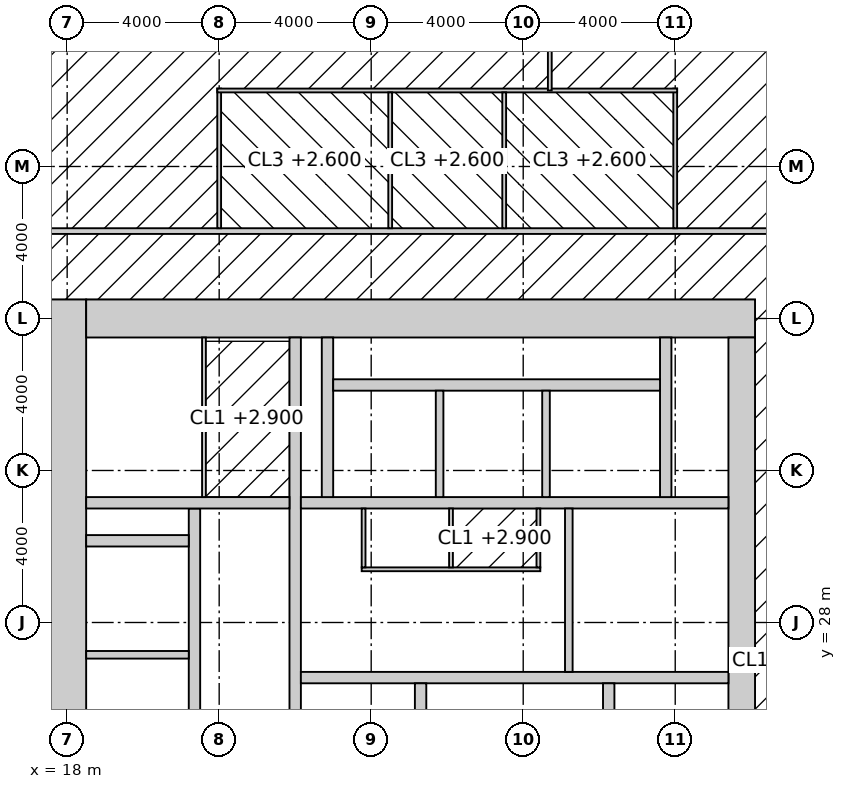
"""IFC4 building model, lengths in metres.
Left out: names, types, materials, properties, quantities, classifications, styles, units other than length and angle.
Written with IfcOpenShell. Run it as: python <this file> out.ifc"""

import sys

from ifc_helpers import new_model, si_unit, direction, frame, frame_2d, origin, place, context, subcontext, project, spatial, rectangle, extrude, element, fill, save


model = new_model("IFC4")
c1 = context("Model", 3, precision=1e-05, world=origin(), true_north=direction((0.0, 1.0)))
c2 = subcontext(c1, "Body", "Model", "MODEL_VIEW")
j1 = project(units=[si_unit("LENGTHUNIT", "METRE"), si_unit("PLANEANGLEUNIT", "RADIAN")], contexts=[c1])
p1 = place(None, origin())
s1 = spatial("IfcSite", under=j1, at=p1, CompositionType="ELEMENT")
p2 = place(p1, origin())
s2 = spatial("IfcBuilding", under=s1, at=p2, CompositionType="ELEMENT")
p3 = place(p2, frame((0.0, 0.0, 113.4)))
s3 = spatial("IfcBuildingStorey", under=s2, at=p3, CompositionType="ELEMENT", Elevation=113.4)
p4 = place(p3, frame((18.0, 17.5, -0.15), z_axis=(0.0, 0.0, 1.0), x_axis=(0.0, 1.0, 0.0)))
e1 = element("IfcWall", 1, at=p4, inside=s3, PredefinedType="SHEAR", context=c2, shape_type="SweptSolid", body=[
    extrude(rectangle(XDim=19.0, YDim=1.0, at=frame_2d((9.5, 0.0))), origin(), (0.0, 0.0, 1.0), 4.0),
])
p5 = place(p3, frame((18.5, 36.0, -0.15), z_axis=(0.0, 0.0, 1.0), x_axis=(1.0, 0.0, 0.0)))
e2 = element("IfcWall", 2, at=p5, inside=s3, PredefinedType="SHEAR", context=c2, shape_type="SweptSolid", body=[
    extrude(rectangle(XDim=17.6, YDim=1.0, at=frame_2d((8.8, 0.0))), origin(), (0.0, 0.0, 1.0), 4.0),
])
p6 = place(p3, frame((35.75, 18.5, -0.15), z_axis=(0.0, 0.0, 1.0), x_axis=(0.0, 1.0, 0.0)))
e3 = element("IfcWall", 3, at=p6, inside=s3, PredefinedType="SHEAR", context=c2, shape_type="SweptSolid", body=[
    extrude(rectangle(XDim=17.0, YDim=0.7, at=frame_2d((8.5, 0.0))), origin(), (0.0, 0.0, 1.0), 4.0),
])
p7 = place(p6, frame((9.85, 0.0, 0.15)))
e4 = element("IfcOpeningElement", 4, at=p7, cuts=e3, PredefinedType="OPENING", context=c2, shape_type="SweptSolid", body=[
    extrude(rectangle(XDim=1.0, YDim=2.2, at=frame_2d((0.5, 1.1))), frame((0.0, 0.36, 0.0), z_axis=(0.0, -1.0, 0.0), x_axis=(1.0, 0.0, 0.0)), (0.0, 0.0, 1.0), 0.72),
])
p8 = place(p3, frame((24.0, 18.5, -0.15), z_axis=(0.0, 0.0, 1.0), x_axis=(0.0, 1.0, 0.0)))
e5 = element("IfcWall", 5, at=p8, inside=s3, PredefinedType="SHEAR", context=c2, shape_type="SweptSolid", body=[
    extrude(rectangle(XDim=17.0, YDim=0.3, at=frame_2d((8.5, 0.0))), origin(), (0.0, 0.0, 1.0), 4.0),
])
p9 = place(p8, frame((9.6, 0.0, 0.15)))
e6 = element("IfcOpeningElement", 6, at=p9, cuts=e5, PredefinedType="OPENING", context=c2, shape_type="SweptSolid", body=[
    extrude(rectangle(XDim=1.5, YDim=2.4, at=frame_2d((0.75, 1.2))), frame((0.0, 0.16, 0.0), z_axis=(0.0, -1.0, 0.0), x_axis=(1.0, 0.0, 0.0)), (0.0, 0.0, 1.0), 0.32),
])
p10 = place(p3, frame((24.15, 26.55, -0.15), z_axis=(0.0, 0.0, 1.0), x_axis=(1.0, 0.0, 0.0)))
e7 = element("IfcWall", 7, at=p10, inside=s3, PredefinedType="SHEAR", context=c2, shape_type="SweptSolid", body=[
    extrude(rectangle(XDim=11.25, YDim=0.3, at=frame_2d((5.625, 0.0))), origin(), (0.0, 0.0, 1.0), 4.0),
])
p11 = place(p10, frame((9.25, 0.0, 0.15)))
e8 = element("IfcOpeningElement", 8, at=p11, cuts=e7, PredefinedType="OPENING", context=c2, shape_type="SweptSolid", body=[
    extrude(rectangle(XDim=1.0, YDim=2.2, at=frame_2d((0.5, 1.1))), frame((0.0, 0.16, 0.0), z_axis=(0.0, -1.0, 0.0), x_axis=(1.0, 0.0, 0.0)), (0.0, 0.0, 1.0), 0.32),
])
p12 = place(p10, frame((4.9, 0.0, 0.15)))
e9 = element("IfcOpeningElement", 9, at=p12, cuts=e7, PredefinedType="OPENING", context=c2, shape_type="SweptSolid", body=[
    extrude(rectangle(XDim=1.5, YDim=2.4, at=frame_2d((0.75, 1.2))), frame((0.0, 0.16, 0.0), z_axis=(0.0, -1.0, 0.0), x_axis=(1.0, 0.0, 0.0)), (0.0, 0.0, 1.0), 0.32),
])
p13 = place(p3, frame((27.3, 18.5, -0.15), z_axis=(0.0, 0.0, 1.0), x_axis=(0.0, 1.0, 0.0)))
e10 = element("IfcWall", 10, at=p13, inside=s3, PredefinedType="SHEAR", context=c2, shape_type="SweptSolid", body=[
    extrude(rectangle(XDim=7.9, YDim=0.3, at=frame_2d((3.95, 0.0))), origin(), (0.0, 0.0, 1.0), 4.0),
])
p14 = place(p13, frame((6.4, 0.0, 0.15)))
e11 = element("IfcOpeningElement", 11, at=p14, cuts=e10, PredefinedType="OPENING", context=c2, shape_type="SweptSolid", body=[
    extrude(rectangle(XDim=1.0, YDim=2.2, at=frame_2d((0.5, 1.1))), frame((0.0, 0.16, 0.0), z_axis=(0.0, -1.0, 0.0), x_axis=(1.0, 0.0, 0.0)), (0.0, 0.0, 1.0), 0.32),
])
p15 = place(p3, frame((32.25, 18.5, -0.15), z_axis=(0.0, 0.0, 1.0), x_axis=(0.0, 1.0, 0.0)))
e12 = element("IfcWall", 12, at=p15, inside=s3, PredefinedType="SHEAR", context=c2, shape_type="SweptSolid", body=[
    extrude(rectangle(XDim=7.9, YDim=0.3, at=frame_2d((3.95, 0.0))), origin(), (0.0, 0.0, 1.0), 4.0),
])
p16 = place(p3, frame((24.15, 31.15, -0.15), z_axis=(0.0, 0.0, 1.0), x_axis=(1.0, 0.0, 0.0)))
e13 = element("IfcWall", 13, at=p16, inside=s3, PredefinedType="SHEAR", context=c2, shape_type="SweptSolid", body=[
    extrude(rectangle(XDim=11.25, YDim=0.3, at=frame_2d((5.625, 0.0))), origin(), (0.0, 0.0, 1.0), 4.0),
])
p17 = place(p16, frame((7.25, 0.0, 0.15)))
e14 = element("IfcOpeningElement", 14, at=p17, cuts=e13, PredefinedType="OPENING", context=c2, shape_type="SweptSolid", body=[
    extrude(rectangle(XDim=1.4, YDim=2.4, at=frame_2d((0.7, 1.2))), frame((0.0, 0.16, 0.0), z_axis=(0.0, -1.0, 0.0), x_axis=(1.0, 0.0, 0.0)), (0.0, 0.0, 1.0), 0.32),
])
p18 = place(p3, frame((21.35, 18.5, -0.15), z_axis=(0.0, 0.0, 1.0), x_axis=(0.0, 1.0, 0.0)))
e15 = element("IfcWall", 15, at=p18, inside=s3, PredefinedType="SHEAR", context=c2, shape_type="SweptSolid", body=[
    extrude(rectangle(XDim=12.5, YDim=0.3, at=frame_2d((6.25, 0.0))), origin(), (0.0, 0.0, 1.0), 4.0),
])
p19 = place(p18, frame((0.875, 0.0, 0.15)))
e16 = element("IfcOpeningElement", 16, at=p19, cuts=e15, PredefinedType="OPENING", context=c2, shape_type="SweptSolid", body=[
    extrude(rectangle(XDim=1.1, YDim=2.2, at=frame_2d((0.55, 1.1))), frame((0.0, 0.16, 0.0), z_axis=(0.0, -1.0, 0.0), x_axis=(1.0, 0.0, 0.0)), (0.0, 0.0, 1.0), 0.32),
])
p20 = place(p18, frame((3.825, 0.0, 0.15)))
e17 = element("IfcOpeningElement", 17, at=p20, cuts=e15, PredefinedType="OPENING", context=c2, shape_type="SweptSolid", body=[
    extrude(rectangle(XDim=1.1, YDim=2.2, at=frame_2d((0.55, 1.1))), frame((0.0, 0.16, 0.0), z_axis=(0.0, -1.0, 0.0), x_axis=(1.0, 0.0, 0.0)), (0.0, 0.0, 1.0), 0.32),
])
p21 = place(p18, frame((6.675, 0.0, 0.15)))
e18 = element("IfcOpeningElement", 18, at=p21, cuts=e15, PredefinedType="OPENING", context=c2, shape_type="SweptSolid", body=[
    extrude(rectangle(XDim=1.1, YDim=2.2, at=frame_2d((0.55, 1.1))), frame((0.0, 0.16, 0.0), z_axis=(0.0, -1.0, 0.0), x_axis=(1.0, 0.0, 0.0)), (0.0, 0.0, 1.0), 0.32),
])
p22 = place(p18, frame((9.575, 0.0, 0.15)))
e19 = element("IfcOpeningElement", 19, at=p22, cuts=e15, PredefinedType="OPENING", context=c2, shape_type="SweptSolid", body=[
    extrude(rectangle(XDim=1.1, YDim=2.2, at=frame_2d((0.55, 1.1))), frame((0.0, 0.16, 0.0), z_axis=(0.0, -1.0, 0.0), x_axis=(1.0, 0.0, 0.0)), (0.0, 0.0, 1.0), 0.32),
])
p23 = place(p3, frame((18.5, 31.15, -0.15), z_axis=(0.0, 0.0, 1.0), x_axis=(1.0, 0.0, 0.0)))
e20 = element("IfcWall", 20, at=p23, inside=s3, PredefinedType="SHEAR", context=c2, shape_type="SweptSolid", body=[
    extrude(rectangle(XDim=5.35, YDim=0.3, at=frame_2d((2.675, 0.0))), origin(), (0.0, 0.0, 1.0), 4.0),
])
p24 = place(p23, frame((3.4, 0.0, 0.15)))
e21 = element("IfcOpeningElement", 21, at=p24, cuts=e20, PredefinedType="OPENING", context=c2, shape_type="SweptSolid", body=[
    extrude(rectangle(XDim=1.0, YDim=2.2, at=frame_2d((0.5, 1.1))), frame((0.0, 0.16, 0.0), z_axis=(0.0, -1.0, 0.0), x_axis=(1.0, 0.0, 0.0)), (0.0, 0.0, 1.0), 0.32),
])
p25 = place(p3, frame((18.5, 30.15, -0.15), z_axis=(0.0, 0.0, 1.0), x_axis=(1.0, 0.0, 0.0)))
e22 = element("IfcWall", 22, at=p25, inside=s3, PredefinedType="SHEAR", context=c2, shape_type="SweptSolid", body=[
    extrude(rectangle(XDim=2.7, YDim=0.3, at=frame_2d((1.35, 0.0))), origin(), (0.0, 0.0, 1.0), 4.0),
])
for number, where, z_axis, x_axis in (
    (23, (24.85, 31.3, -0.15), (0.0, 0.0, 1.0), (0.0, 1.0, 0.0)),
    (24, (33.75, 31.3, -0.15), (0.0, 0.0, 1.0), (0.0, 1.0, 0.0)),
):
    element("IfcWall", number, at=place(p3, frame(where, z_axis=z_axis, x_axis=x_axis)), inside=s3, PredefinedType="SHEAR", context=c2, shape_type="SweptSolid", body=[
        extrude(rectangle(XDim=4.2, YDim=0.3, at=frame_2d((2.1, 0.0))), origin(), (0.0, 0.0, 1.0), 4.0),
    ])
p26 = place(p3, frame((25.0, 34.25, -0.15), z_axis=(0.0, 0.0, 1.0), x_axis=(1.0, 0.0, 0.0)))
e25 = element("IfcWall", 25, at=p26, inside=s3, PredefinedType="SHEAR", context=c2, shape_type="SweptSolid", body=[
    extrude(rectangle(XDim=8.6, YDim=0.3, at=frame_2d((4.3, 0.0))), origin(), (0.0, 0.0, 1.0), 4.0),
])
for number, where, z_axis, x_axis in (
    (26, (27.8, 31.3, -0.15), (0.0, 0.0, 1.0), (0.0, 1.0, 0.0)),
    (27, (30.6, 31.3, -0.15), (0.0, 0.0, 1.0), (0.0, 1.0, 0.0)),
):
    element("IfcWall", number, at=place(p3, frame(where, z_axis=z_axis, x_axis=x_axis)), inside=s3, PredefinedType="SOLIDWALL", context=c2, shape_type="SweptSolid", body=[
        extrude(rectangle(XDim=2.8, YDim=0.2, at=frame_2d((1.4, 0.0))), origin(), (0.0, 0.0, 1.0), 4.0),
    ])
p27 = place(p3, frame((18.5, 27.15, -0.15), z_axis=(0.0, 0.0, 1.0), x_axis=(1.0, 0.0, 0.0)))
e28 = element("IfcWall", 28, at=p27, inside=s3, PredefinedType="SOLIDWALL", context=c2, shape_type="SweptSolid", body=[
    extrude(rectangle(XDim=2.7, YDim=0.2, at=frame_2d((1.35, 0.0))), origin(), (0.0, 0.0, 1.0), 4.0),
])
p28 = place(p3, frame((31.2, 26.7, 0.0), z_axis=(0.0, 0.0, 1.0), x_axis=(0.0, 1.0, 0.0)))
e29 = element("IfcWall", 29, at=p28, inside=s3, PredefinedType="SOLIDWALL", context=c2, shape_type="SweptSolid", body=[
    extrude(rectangle(XDim=4.3, YDim=0.2, at=frame_2d((2.15, 0.0))), origin(), (0.0, 0.0, 1.0), 3.85),
])
p29 = place(p3, frame((21.6, 31.3, 0.0), z_axis=(0.0, 0.0, 1.0), x_axis=(0.0, 1.0, 0.0)))
e30 = element("IfcWall", 30, at=p29, inside=s3, PredefinedType="PARTITIONING", context=c2, shape_type="SweptSolid", body=[
    extrude(rectangle(XDim=4.2, YDim=0.1, at=frame_2d((2.1, 0.0))), origin(), (0.0, 0.0, 1.0), 3.85),
])
p30 = place(p29, frame((1.55, 0.0, 0.0)))
e31 = element("IfcOpeningElement", 31, at=p30, cuts=e30, PredefinedType="OPENING", context=c2, shape_type="SweptSolid", body=[
    extrude(rectangle(XDim=1.0, YDim=2.2, at=frame_2d((0.5, 1.1))), frame((0.0, 0.06, 0.0), z_axis=(0.0, -1.0, 0.0), x_axis=(1.0, 0.0, 0.0)), (0.0, 0.0, 1.0), 0.12),
])
p31 = place(p3, frame((25.75, 29.4, 0.0), z_axis=(0.0, 0.0, 1.0), x_axis=(1.0, 0.0, 0.0)))
e32 = element("IfcWall", 32, at=p31, inside=s3, PredefinedType="PARTITIONING", context=c2, shape_type="SweptSolid", body=[
    extrude(rectangle(XDim=4.7, YDim=0.1, at=frame_2d((2.35, 0.0))), origin(), (0.0, 0.0, 1.0), 3.85),
])
p32 = place(p31, frame((0.7, 0.0, 0.0)))
e33 = element("IfcOpeningElement", 33, at=p32, cuts=e32, PredefinedType="OPENING", context=c2, shape_type="SweptSolid", body=[
    extrude(rectangle(XDim=1.0, YDim=2.2, at=frame_2d((0.5, 1.1))), frame((0.0, 0.06, 0.0), z_axis=(0.0, -1.0, 0.0), x_axis=(1.0, 0.0, 0.0)), (0.0, 0.0, 1.0), 0.12),
])
p33 = place(p31, frame((3.0, 0.0, 0.0)))
e34 = element("IfcOpeningElement", 34, at=p33, cuts=e32, PredefinedType="OPENING", context=c2, shape_type="SweptSolid", body=[
    extrude(rectangle(XDim=1.0, YDim=2.2, at=frame_2d((0.5, 1.1))), frame((0.0, 0.06, 0.0), z_axis=(0.0, -1.0, 0.0), x_axis=(1.0, 0.0, 0.0)), (0.0, 0.0, 1.0), 0.12),
])
for number, where, z_axis, x_axis in (
    (35, (25.8, 29.45, 0.0), (0.0, 0.0, 1.0), (0.0, 1.0, 0.0)),
    (36, (30.4, 29.45, 0.0), (0.0, 0.0, 1.0), (0.0, 1.0, 0.0)),
    (37, (28.1, 29.45, 0.0), (0.0, 0.0, 1.0), (0.0, 1.0, 0.0)),
):
    element("IfcWall", number, at=place(p3, frame(where, z_axis=z_axis, x_axis=x_axis)), inside=s3, PredefinedType="PARTITIONING", context=c2, shape_type="SweptSolid", body=[
        extrude(rectangle(XDim=1.55, YDim=0.1, at=frame_2d((0.775, 0.0))), origin(), (0.0, 0.0, 1.0), 3.85),
    ])
p34 = place(p3, frame((17.5, 38.3, 0.0), z_axis=(0.0, 0.0, 1.0), x_axis=(1.0, 0.0, 0.0)))
e38 = element("IfcWall", 38, at=p34, inside=s3, PredefinedType="PARTITIONING", context=c2, shape_type="SweptSolid", body=[
    extrude(rectangle(XDim=20.325, YDim=0.15, at=frame_2d((10.163, 0.0))), origin(), (0.0, 0.0, 1.0), 3.85),
])
p35 = place(p34, frame((6.25, 0.0, 0.0)))
e39 = element("IfcOpeningElement", 39, at=p35, cuts=e38, PredefinedType="OPENING", context=c2, shape_type="SweptSolid", body=[
    extrude(rectangle(XDim=0.9, YDim=2.1, at=frame_2d((0.45, 1.05))), frame((0.0, 0.085, 0.0), z_axis=(0.0, -1.0, 0.0), x_axis=(1.0, 0.0, 0.0)), (0.0, 0.0, 1.0), 0.17),
])
p36 = place(p34, frame((10.0, 0.0, 0.0)))
e40 = element("IfcOpeningElement", 40, at=p36, cuts=e38, PredefinedType="OPENING", context=c2, shape_type="SweptSolid", body=[
    extrude(rectangle(XDim=1.0, YDim=2.1, at=frame_2d((0.5, 1.05))), frame((0.0, 0.085, 0.0), z_axis=(0.0, -1.0, 0.0), x_axis=(1.0, 0.0, 0.0)), (0.0, 0.0, 1.0), 0.17),
])
p37 = place(p34, frame((13.85, 0.0, 0.0)))
e41 = element("IfcOpeningElement", 41, at=p37, cuts=e38, PredefinedType="OPENING", context=c2, shape_type="SweptSolid", body=[
    extrude(rectangle(XDim=0.9, YDim=2.1, at=frame_2d((0.45, 1.05))), frame((0.0, 0.085, 0.0), z_axis=(0.0, -1.0, 0.0), x_axis=(1.0, 0.0, 0.0)), (0.0, 0.0, 1.0), 0.17),
])
for number, where, z_axis, x_axis in (
    (42, (22.0, 38.375, 0.0), (0.0, 0.0, 1.0), (0.0, 1.0, 0.0)),
    (43, (34.0, 38.375, 0.0), (0.0, 0.0, 1.0), (0.0, 1.0, 0.0)),
):
    element("IfcWall", number, at=place(p3, frame(where, z_axis=z_axis, x_axis=x_axis)), inside=s3, PredefinedType="PARTITIONING", context=c2, shape_type="SweptSolid", body=[
        extrude(rectangle(XDim=3.675, YDim=0.1, at=frame_2d((1.837, 0.0))), origin(), (0.0, 0.0, 1.0), 2.95),
    ])
p38 = place(p3, frame((21.95, 42.0, 0.0), z_axis=(0.0, 0.0, 1.0), x_axis=(1.0, 0.0, 0.0)))
e44 = element("IfcWall", 44, at=p38, inside=s3, PredefinedType="PARTITIONING", context=c2, shape_type="SweptSolid", body=[
    extrude(rectangle(XDim=12.1, YDim=0.1, at=frame_2d((6.05, 0.0))), origin(), (0.0, 0.0, 1.0), 3.85),
])
for number, where, z_axis, x_axis in (
    (45, (26.5, 38.375, 0.0), (0.0, 0.0, 1.0), (0.0, 1.0, 0.0)),
    (46, (29.5, 38.375, 0.0), (0.0, 0.0, 1.0), (0.0, 1.0, 0.0)),
):
    element("IfcWall", number, at=place(p3, frame(where, z_axis=z_axis, x_axis=x_axis)), inside=s3, PredefinedType="PARTITIONING", context=c2, shape_type="SweptSolid", body=[
        extrude(rectangle(XDim=3.575, YDim=0.1, at=frame_2d((1.788, 0.0))), origin(), (0.0, 0.0, 1.0), 3.85),
    ])
p39 = place(p3, frame((30.7, 42.0, 0.0), z_axis=(0.0, 0.0, 1.0), x_axis=(0.0, 1.0, 0.0)))
e47 = element("IfcWall", 47, at=p39, inside=s3, PredefinedType="PARTITIONING", context=c2, shape_type="SweptSolid", body=[
    extrude(rectangle(XDim=9.7, YDim=0.1, at=frame_2d((4.85, 0.0))), origin(), (0.0, 0.0, 1.0), 3.85),
])
p40 = place(p39, frame((4.35, 0.0, 0.0)))
e48 = element("IfcOpeningElement", 48, at=p40, cuts=e47, PredefinedType="OPENING", context=c2, shape_type="SweptSolid", body=[
    extrude(rectangle(XDim=1.0, YDim=2.2, at=frame_2d((0.5, 1.1))), frame((0.0, 0.06, 0.0), z_axis=(0.0, -1.0, 0.0), x_axis=(1.0, 0.0, 0.0)), (0.0, 0.0, 1.0), 0.12),
])
p41 = place(p14, origin())
e49 = element("IfcDoor", 49, at=p41, inside=s3, OperationType="SINGLE_SWING_RIGHT", PredefinedType="DOOR", context=c2, shape_type="SweptSolid", body=[
    extrude(rectangle(XDim=1.0, YDim=2.2, at=frame_2d((0.5, 1.1))), frame((0.0, 0.025, 0.0), z_axis=(0.0, -1.0, 0.0), x_axis=(1.0, 0.0, 0.0)), (0.0, 0.0, 1.0), 0.05),
])
fill(e11, e49)
p42 = place(p11, frame((1.0, 0.0, 0.0), z_axis=(0.0, 0.0, 1.0), x_axis=(-1.0, 0.0, 0.0)))
e50 = element("IfcDoor", 50, at=p42, inside=s3, OperationType="SINGLE_SWING_RIGHT", PredefinedType="DOOR", context=c2, shape_type="SweptSolid", body=[
    extrude(rectangle(XDim=1.0, YDim=2.2, at=frame_2d((0.5, 1.1))), frame((0.0, 0.025, 0.0), z_axis=(0.0, -1.0, 0.0), x_axis=(1.0, 0.0, 0.0)), (0.0, 0.0, 1.0), 0.05),
])
fill(e8, e50)
p43 = place(p7, origin())
e51 = element("IfcDoor", 51, at=p43, inside=s3, OperationType="SINGLE_SWING_RIGHT", PredefinedType="DOOR", context=c2, shape_type="SweptSolid", body=[
    extrude(rectangle(XDim=1.0, YDim=2.2, at=frame_2d((0.5, 1.1))), frame((0.0, 0.025, 0.0), z_axis=(0.0, -1.0, 0.0), x_axis=(1.0, 0.0, 0.0)), (0.0, 0.0, 1.0), 0.05),
])
fill(e4, e51)
p44 = place(p12, origin())
e52 = element("IfcDoor", 52, at=p44, inside=s3, OperationType="DOUBLE_DOOR_DOUBLE_SWING", PredefinedType="DOOR", context=c2, shape_type="SweptSolid", body=[
    extrude(rectangle(XDim=1.5, YDim=2.4, at=frame_2d((0.75, 1.2))), frame((0.0, 0.025, 0.0), z_axis=(0.0, -1.0, 0.0), x_axis=(1.0, 0.0, 0.0)), (0.0, 0.0, 1.0), 0.05),
])
fill(e9, e52)
p45 = place(p9, origin())
e53 = element("IfcDoor", 53, at=p45, inside=s3, OperationType="DOUBLE_DOOR_DOUBLE_SWING", PredefinedType="DOOR", context=c2, shape_type="SweptSolid", body=[
    extrude(rectangle(XDim=1.5, YDim=2.4, at=frame_2d((0.75, 1.2))), frame((0.0, 0.025, 0.0), z_axis=(0.0, -1.0, 0.0), x_axis=(1.0, 0.0, 0.0)), (0.0, 0.0, 1.0), 0.05),
])
fill(e6, e53)
p46 = place(p24, origin())
e54 = element("IfcDoor", 54, at=p46, inside=s3, OperationType="SINGLE_SWING_LEFT", PredefinedType="DOOR", context=c2, shape_type="SweptSolid", body=[
    extrude(rectangle(XDim=1.0, YDim=2.2, at=frame_2d((0.5, 1.1))), frame((0.0, 0.025, 0.0), z_axis=(0.0, -1.0, 0.0), x_axis=(1.0, 0.0, 0.0)), (0.0, 0.0, 1.0), 0.05),
])
fill(e21, e54)
p47 = place(p30, origin())
e55 = element("IfcDoor", 55, at=p47, inside=s3, OperationType="SINGLE_SWING_LEFT", PredefinedType="DOOR", context=c2, shape_type="SweptSolid", body=[
    extrude(rectangle(XDim=1.0, YDim=2.2, at=frame_2d((0.5, 1.1))), frame((0.0, 0.025, 0.0), z_axis=(0.0, -1.0, 0.0), x_axis=(1.0, 0.0, 0.0)), (0.0, 0.0, 1.0), 0.05),
])
fill(e31, e55)
p48 = place(p32, origin())
e56 = element("IfcDoor", 56, at=p48, inside=s3, OperationType="SINGLE_SWING_LEFT", PredefinedType="DOOR", context=c2, shape_type="SweptSolid", body=[
    extrude(rectangle(XDim=1.0, YDim=2.2, at=frame_2d((0.5, 1.1))), frame((0.0, 0.025, 0.0), z_axis=(0.0, -1.0, 0.0), x_axis=(1.0, 0.0, 0.0)), (0.0, 0.0, 1.0), 0.05),
])
fill(e33, e56)
p49 = place(p33, origin())
e57 = element("IfcDoor", 57, at=p49, inside=s3, OperationType="SINGLE_SWING_LEFT", PredefinedType="DOOR", context=c2, shape_type="SweptSolid", body=[
    extrude(rectangle(XDim=1.0, YDim=2.2, at=frame_2d((0.5, 1.1))), frame((0.0, 0.025, 0.0), z_axis=(0.0, -1.0, 0.0), x_axis=(1.0, 0.0, 0.0)), (0.0, 0.0, 1.0), 0.05),
])
fill(e34, e57)
p50 = place(p35, origin())
e58 = element("IfcDoor", 58, at=p50, inside=s3, OperationType="SINGLE_SWING_LEFT", PredefinedType="DOOR", context=c2, shape_type="SweptSolid", body=[
    extrude(rectangle(XDim=0.9, YDim=2.1, at=frame_2d((0.45, 1.05))), frame((0.0, 0.025, 0.0), z_axis=(0.0, -1.0, 0.0), x_axis=(1.0, 0.0, 0.0)), (0.0, 0.0, 1.0), 0.05),
])
fill(e39, e58)
p51 = place(p36, origin())
e59 = element("IfcDoor", 59, at=p51, inside=s3, OperationType="SLIDING_TO_LEFT", PredefinedType="DOOR", context=c2, shape_type="SweptSolid", body=[
    extrude(rectangle(XDim=1.0, YDim=2.1, at=frame_2d((0.5, 1.05))), frame((0.0, 0.025, 0.0), z_axis=(0.0, -1.0, 0.0), x_axis=(1.0, 0.0, 0.0)), (0.0, 0.0, 1.0), 0.05),
])
fill(e40, e59)
p52 = place(p37, origin())
e60 = element("IfcDoor", 60, at=p52, inside=s3, OperationType="SINGLE_SWING_LEFT", PredefinedType="DOOR", context=c2, shape_type="SweptSolid", body=[
    extrude(rectangle(XDim=0.9, YDim=2.1, at=frame_2d((0.45, 1.05))), frame((0.0, 0.025, 0.0), z_axis=(0.0, -1.0, 0.0), x_axis=(1.0, 0.0, 0.0)), (0.0, 0.0, 1.0), 0.05),
])
fill(e41, e60)
p53 = place(p17, origin())
e61 = element("IfcDoor", 61, at=p53, inside=s3, OperationType="DOUBLE_DOOR_SLIDING", PredefinedType="DOOR", context=c2, shape_type="SweptSolid", body=[
    extrude(rectangle(XDim=1.4, YDim=2.4, at=frame_2d((0.7, 1.2))), frame((0.0, 0.025, 0.0), z_axis=(0.0, -1.0, 0.0), x_axis=(1.0, 0.0, 0.0)), (0.0, 0.0, 1.0), 0.05),
])
fill(e14, e61)
p54 = place(p21, origin())
e62 = element("IfcDoor", 62, at=p54, inside=s3, OperationType="DOUBLE_DOOR_SLIDING", PredefinedType="DOOR", context=c2, shape_type="SweptSolid", body=[
    extrude(rectangle(XDim=1.1, YDim=2.2, at=frame_2d((0.55, 1.1))), frame((0.0, 0.025, 0.0), z_axis=(0.0, -1.0, 0.0), x_axis=(1.0, 0.0, 0.0)), (0.0, 0.0, 1.0), 0.05),
])
fill(e18, e62)
p55 = place(p22, origin())
e63 = element("IfcDoor", 63, at=p55, inside=s3, OperationType="DOUBLE_DOOR_SLIDING", PredefinedType="DOOR", context=c2, shape_type="SweptSolid", body=[
    extrude(rectangle(XDim=1.1, YDim=2.2, at=frame_2d((0.55, 1.1))), frame((0.0, 0.025, 0.0), z_axis=(0.0, -1.0, 0.0), x_axis=(1.0, 0.0, 0.0)), (0.0, 0.0, 1.0), 0.05),
])
fill(e19, e63)
save(model, sys.argv[1])
